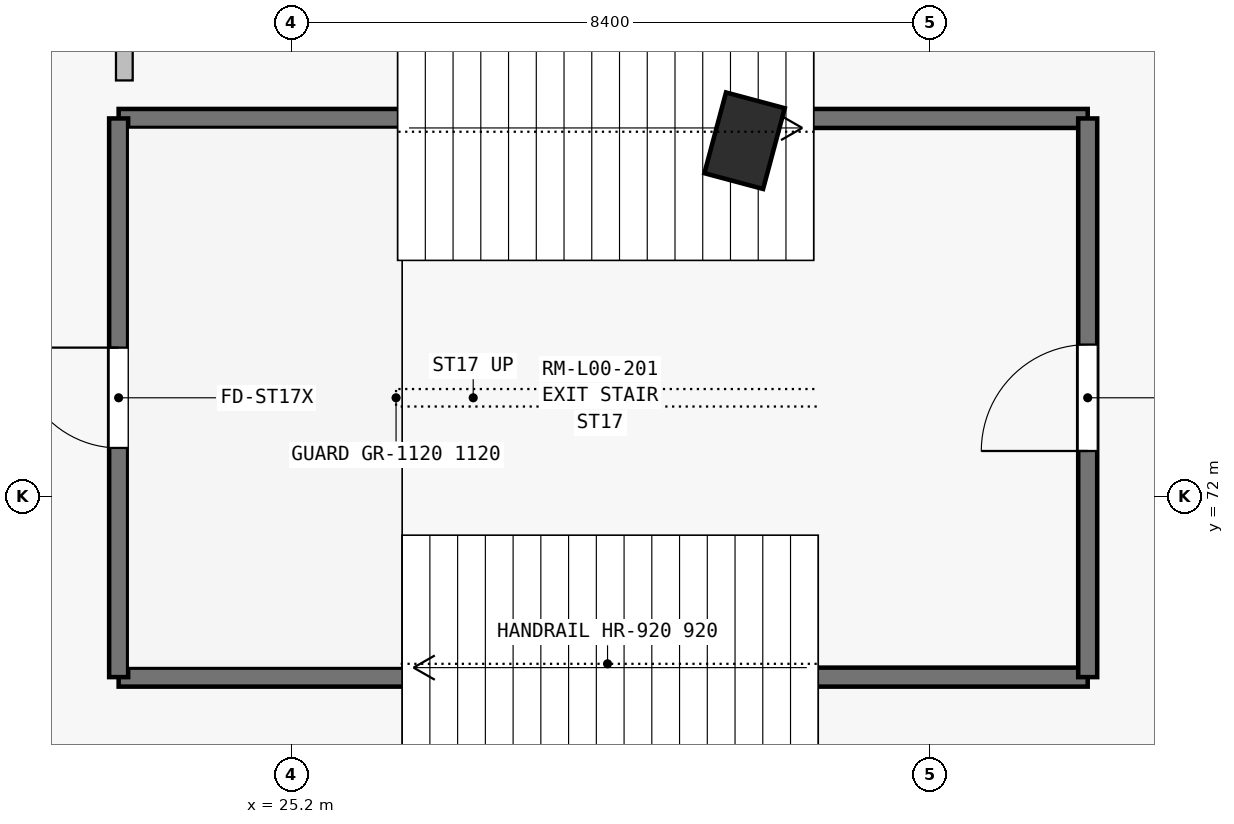
"""IFC4 building model, lengths in metres.
Left out: names, types, materials, properties, quantities, classifications, styles, units other than length and angle.
Written with IfcOpenShell. Run it as: python <this file> out.ifc"""

import sys

from ifc_helpers import new_model, si_unit, direction, frame, frame_2d, origin, origin_2d, place, context, subcontext, project, spatial, rectangle, extrude, element, fill, save


model = new_model("IFC4")
c1 = context("Model", 3, precision=1e-05, world=origin(), true_north=direction((0.0, 1.0)))
c2 = subcontext(c1, "Body", "Model", "MODEL_VIEW")
j1 = project(units=[si_unit("LENGTHUNIT", "METRE"), si_unit("PLANEANGLEUNIT", "RADIAN")], contexts=[c1])
p1 = place(None, origin())
s1 = spatial("IfcSite", under=j1, at=p1, CompositionType="ELEMENT")
p2 = place(p1, origin())
s2 = spatial("IfcBuilding", under=s1, at=p2, CompositionType="ELEMENT")
p3 = place(p2, origin())
s3 = spatial("IfcBuildingStorey", under=s2, at=p3, CompositionType="ELEMENT", Elevation=0.0)
p4 = place(p3, frame((31.16, 76.682, 0.0), z_axis=(0.0, 0.0, 1.0), x_axis=(-0.965925826289, 0.258819045103, 0.0)))
e1 = element("IfcColumn", 1, at=p4, inside=s3, PredefinedType="COLUMN", context=c2, shape_type="SweptSolid", body=[
    extrude(rectangle(XDim=0.8, YDim=1.1, at=origin_2d()), origin(), (0.0, 0.0, 1.0), 5.4),
])
for number, where, z_axis, x_axis in (
    (2, (22.925, 69.625, 0.0), (0.0, 0.0, 1.0), (1.0, 0.0, 0.0)),
    (3, (22.925, 76.975, 0.0), (0.0, 0.0, 1.0), (1.0, 0.0, 0.0)),
):
    element("IfcWall", number, at=place(p3, frame(where, z_axis=z_axis, x_axis=x_axis)), inside=s3, PredefinedType="SHEAR", context=c2, shape_type="SweptSolid", body=[
        extrude(rectangle(XDim=12.75, YDim=0.25, at=frame_2d((6.375, 0.0))), origin(), (0.0, 0.0, 1.0), 5.4),
    ])
p5 = place(p3, frame((22.925, 69.625, 0.0), z_axis=(0.0, 0.0, 1.0), x_axis=(0.0, 1.0, 0.0)))
e4 = element("IfcWall", 4, at=p5, inside=s3, PredefinedType="SHEAR", context=c2, shape_type="SweptSolid", body=[
    extrude(rectangle(XDim=7.35, YDim=0.25, at=frame_2d((3.675, 0.0))), origin(), (0.0, 0.0, 1.0), 5.4),
])
p6 = place(p5, frame((3.015, 0.0, 0.0)))
e5 = element("IfcOpeningElement", 5, at=p6, cuts=e4, PredefinedType="OPENING", context=c2, shape_type="SweptSolid", body=[
    extrude(rectangle(XDim=1.32, YDim=2.2, at=frame_2d((0.66, 1.1))), frame((0.0, 0.135, 0.0), z_axis=(0.0, -1.0, 0.0), x_axis=(1.0, 0.0, 0.0)), (0.0, 0.0, 1.0), 0.27),
])
p7 = place(p3, frame((35.675, 69.625, 0.0), z_axis=(0.0, 0.0, 1.0), x_axis=(0.0, 1.0, 0.0)))
e6 = element("IfcWall", 6, at=p7, inside=s3, PredefinedType="SHEAR", context=c2, shape_type="SweptSolid", body=[
    extrude(rectangle(XDim=7.35, YDim=0.25, at=frame_2d((3.675, 0.0))), origin(), (0.0, 0.0, 1.0), 5.4),
])
p8 = place(p7, frame((2.975, 0.0, 0.0)))
e7 = element("IfcOpeningElement", 7, at=p8, cuts=e6, PredefinedType="OPENING", context=c2, shape_type="SweptSolid", body=[
    extrude(rectangle(XDim=1.4, YDim=2.2, at=frame_2d((0.7, 1.1))), frame((0.0, 0.135, 0.0), z_axis=(0.0, -1.0, 0.0), x_axis=(1.0, 0.0, 0.0)), (0.0, 0.0, 1.0), 0.27),
])
p9 = place(p3, frame((23.0, 83.015, 0.0), z_axis=(0.0, 0.0, 1.0), x_axis=(0.0, -1.0, 0.0)))
e8 = element("IfcWall", 8, at=p9, inside=s3, PredefinedType="SOLIDWALL", context=c2, shape_type="SweptSolid", body=[
    extrude(rectangle(XDim=5.54, YDim=0.22, at=frame_2d((2.77, 0.0))), origin(), (0.0, 0.0, 1.0), 4.305),
])
p10 = place(p8, origin())
e9 = element("IfcDoor", 9, at=p10, inside=s3, OperationType="SINGLE_SWING_LEFT", PredefinedType="DOOR", context=c2, shape_type="SweptSolid", body=[
    extrude(rectangle(XDim=1.4, YDim=2.2, at=frame_2d((0.7, 1.1))), frame((0.0, 0.025, 0.0), z_axis=(0.0, -1.0, 0.0), x_axis=(1.0, 0.0, 0.0)), (0.0, 0.0, 1.0), 0.05),
])
fill(e7, e9)
p11 = place(p6, origin())
e10 = element("IfcDoor", 10, at=p11, inside=s3, OperationType="SINGLE_SWING_RIGHT", PredefinedType="DOOR", context=c2, shape_type="SweptSolid", body=[
    extrude(rectangle(XDim=1.32, YDim=2.2, at=frame_2d((0.66, 1.1))), frame((0.0, 0.025, 0.0), z_axis=(0.0, -1.0, 0.0), x_axis=(1.0, 0.0, 0.0)), (0.0, 0.0, 1.0), 0.05),
])
fill(e5, e10)
save(model, sys.argv[1])
